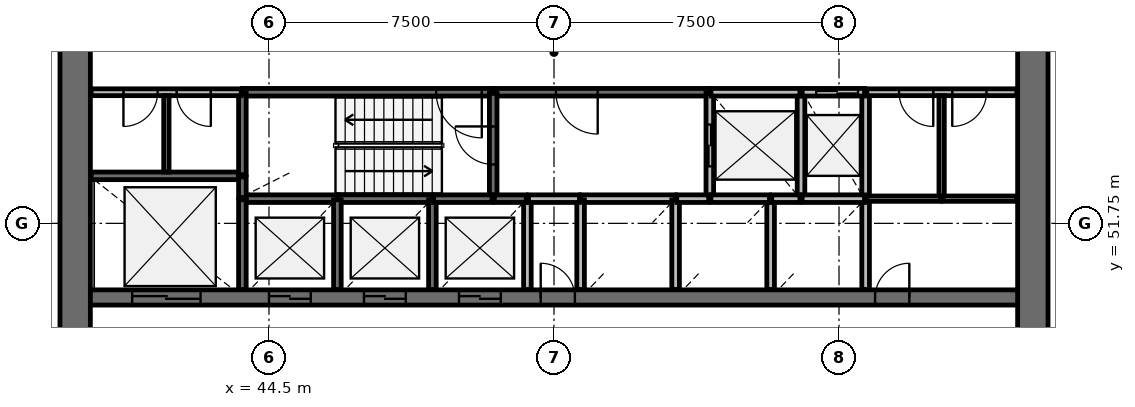
"""IFC4 building model, lengths in metres.
Left out: names, types, materials, properties, quantities, classifications, styles, units other than length and angle.
Written with IfcOpenShell. Run it as: python <this file> out.ifc"""

import sys

from ifc_helpers import new_model, si_unit, direction, frame, frame_2d, origin, place, context, subcontext, project, spatial, rectangle, extrude, source, transform, mapped, element, fill, save


model = new_model("IFC4")
c1 = context("Model", 3, precision=1e-05, world=origin(), true_north=direction((0.0, 1.0)))
c2 = subcontext(c1, "Body", "Model", "MODEL_VIEW")
j1 = project(units=[si_unit("LENGTHUNIT", "METRE"), si_unit("PLANEANGLEUNIT", "RADIAN")], contexts=[c1])
p1 = place(None, origin())
s1 = spatial("IfcSite", under=j1, at=p1, CompositionType="ELEMENT")
p2 = place(p1, origin())
s2 = spatial("IfcBuilding", under=s1, at=p2, CompositionType="ELEMENT")
p3 = place(p2, frame((0.0, 0.0, 100.3)))
s3 = spatial("IfcBuildingStorey", under=s2, at=p3, CompositionType="ELEMENT", Elevation=100.3)
p4 = place(p3, frame((64.6, 38.0, 0.0), z_axis=(0.0, 0.0, 1.0), x_axis=(0.0, 1.0, 0.0)))
e1 = element("IfcWall", 1, at=p4, inside=s3, PredefinedType="SHEAR", context=c2, shape_type="SweptSolid", body=[
    extrude(rectangle(XDim=20.0, YDim=0.8, at=frame_2d((10.0, 0.0))), origin(), (0.0, 0.0, 1.0), 4.1),
])
p5 = place(p4, frame((9.1, 0.0, 0.0)))
e2 = element("IfcOpeningElement", 2, at=p5, cuts=e1, PredefinedType="OPENING", context=c2, shape_type="SweptSolid", body=[
    extrude(rectangle(XDim=1.8, YDim=2.1, at=frame_2d((0.9, 1.05))), frame((0.0, 0.41, 0.0), z_axis=(0.0, -1.0, 0.0), x_axis=(1.0, 0.0, 0.0)), (0.0, 0.0, 1.0), 0.82),
])
p6 = place(p3, frame((39.4, 58.0, 0.0), z_axis=(0.0, 0.0, 1.0), x_axis=(0.0, -1.0, 0.0)))
e3 = element("IfcWall", 3, at=p6, inside=s3, PredefinedType="SHEAR", context=c2, shape_type="SweptSolid", body=[
    extrude(rectangle(XDim=20.0, YDim=0.8, at=frame_2d((10.0, 0.0))), origin(), (0.0, 0.0, 1.0), 4.1),
])
p7 = place(p6, frame((9.1, 0.0, 0.0)))
e4 = element("IfcOpeningElement", 4, at=p7, cuts=e3, PredefinedType="OPENING", context=c2, shape_type="SweptSolid", body=[
    extrude(rectangle(XDim=1.8, YDim=2.1, at=frame_2d((0.9, 1.05))), frame((0.0, 0.41, 0.0), z_axis=(0.0, -1.0, 0.0), x_axis=(1.0, 0.0, 0.0)), (0.0, 0.0, 1.0), 0.82),
])
p8 = place(p3, frame((39.8, 49.8, 0.0), z_axis=(0.0, 0.0, 1.0), x_axis=(1.0, 0.0, 0.0)))
e5 = element("IfcWall", 5, at=p8, inside=s3, PredefinedType="SHEAR", context=c2, shape_type="SweptSolid", body=[
    extrude(rectangle(XDim=24.4, YDim=0.4, at=frame_2d((12.2, 0.0))), origin(), (0.0, 0.0, 1.0), 4.1),
])
p9 = place(p8, frame((4.7, 0.0, 0.0)))
e6 = element("IfcOpeningElement", 6, at=p9, cuts=e5, PredefinedType="OPENING", context=c2, shape_type="SweptSolid", body=[
    extrude(rectangle(XDim=1.1, YDim=2.1, at=frame_2d((0.55, 1.05))), frame((0.0, 0.21, 0.0), z_axis=(0.0, -1.0, 0.0), x_axis=(1.0, 0.0, 0.0)), (0.0, 0.0, 1.0), 0.42),
])
p10 = place(p8, frame((7.2, 0.0, 0.0)))
e7 = element("IfcOpeningElement", 7, at=p10, cuts=e5, PredefinedType="OPENING", context=c2, shape_type="SweptSolid", body=[
    extrude(rectangle(XDim=1.1, YDim=2.1, at=frame_2d((0.55, 1.05))), frame((0.0, 0.21, 0.0), z_axis=(0.0, -1.0, 0.0), x_axis=(1.0, 0.0, 0.0)), (0.0, 0.0, 1.0), 0.42),
])
p11 = place(p8, frame((9.7, 0.0, 0.0)))
e8 = element("IfcOpeningElement", 8, at=p11, cuts=e5, PredefinedType="OPENING", context=c2, shape_type="SweptSolid", body=[
    extrude(rectangle(XDim=1.1, YDim=2.1, at=frame_2d((0.55, 1.05))), frame((0.0, 0.21, 0.0), z_axis=(0.0, -1.0, 0.0), x_axis=(1.0, 0.0, 0.0)), (0.0, 0.0, 1.0), 0.42),
])
p12 = place(p8, frame((1.1, 0.0, 0.0)))
e9 = element("IfcOpeningElement", 9, at=p12, cuts=e5, PredefinedType="OPENING", context=c2, shape_type="SweptSolid", body=[
    extrude(rectangle(XDim=1.8, YDim=2.4, at=frame_2d((0.9, 1.2))), frame((0.0, 0.21, 0.0), z_axis=(0.0, -1.0, 0.0), x_axis=(1.0, 0.0, 0.0)), (0.0, 0.0, 1.0), 0.42),
])
p13 = place(p8, frame((20.65, 0.0, 0.0)))
e10 = element("IfcOpeningElement", 10, at=p13, cuts=e5, PredefinedType="OPENING", context=c2, shape_type="SweptSolid", body=[
    extrude(rectangle(XDim=0.9, YDim=2.1, at=frame_2d((0.45, 1.05))), frame((0.0, 0.21, 0.0), z_axis=(0.0, -1.0, 0.0), x_axis=(1.0, 0.0, 0.0)), (0.0, 0.0, 1.0), 0.42),
])
p14 = place(p8, frame((11.85, 0.0, 0.0)))
e11 = element("IfcOpeningElement", 11, at=p14, cuts=e5, PredefinedType="OPENING", context=c2, shape_type="SweptSolid", body=[
    extrude(rectangle(XDim=0.9, YDim=2.1, at=frame_2d((0.45, 1.05))), frame((0.0, 0.21, 0.0), z_axis=(0.0, -1.0, 0.0), x_axis=(1.0, 0.0, 0.0)), (0.0, 0.0, 1.0), 0.42),
])
p15 = place(p3, frame((50.4, 55.2, 0.0), z_axis=(0.0, 0.0, 1.0), x_axis=(-1.0, 0.0, 0.0)))
e12 = element("IfcWall", 12, at=p15, inside=s3, PredefinedType="SOLIDWALL", context=c2, shape_type="SweptSolid", body=[
    extrude(rectangle(XDim=6.6, YDim=0.2, at=frame_2d((3.3, 0.0))), origin(), (0.0, 0.0, 1.0), 3.7),
])
p16 = place(p15, frame((0.3, 0.0, 0.0)))
e13 = element("IfcOpeningElement", 13, at=p16, cuts=e12, PredefinedType="OPENING", context=c2, shape_type="SweptSolid", body=[
    extrude(rectangle(XDim=1.2, YDim=2.1, at=frame_2d((0.6, 1.05))), frame((0.0, 0.11, 0.0), z_axis=(0.0, -1.0, 0.0), x_axis=(1.0, 0.0, 0.0)), (0.0, 0.0, 1.0), 0.22),
])
p17 = place(p3, frame((56.1, 55.2, 0.0), z_axis=(0.0, 0.0, 1.0), x_axis=(-1.0, 0.0, 0.0)))
e14 = element("IfcWall", 14, at=p17, inside=s3, PredefinedType="SOLIDWALL", context=c2, shape_type="SweptSolid", body=[
    extrude(rectangle(XDim=5.67, YDim=0.2, at=frame_2d((2.835, 0.0))), origin(), (0.0, 0.0, 1.0), 3.7),
])
p18 = place(p17, frame((2.95, 0.0, 0.0)))
e15 = element("IfcOpeningElement", 15, at=p18, cuts=e14, PredefinedType="OPENING", context=c2, shape_type="SweptSolid", body=[
    extrude(rectangle(XDim=1.1, YDim=2.1, at=frame_2d((0.55, 1.05))), frame((0.0, 0.11, 0.0), z_axis=(0.0, -1.0, 0.0), x_axis=(1.0, 0.0, 0.0)), (0.0, 0.0, 1.0), 0.22),
])
p19 = place(p3, frame((43.8, 53.0, 0.0), z_axis=(0.0, 0.0, 1.0), x_axis=(-1.0, 0.0, 0.0)))
e16 = element("IfcWall", 16, at=p19, inside=s3, PredefinedType="SOLIDWALL", context=c2, shape_type="SweptSolid", body=[
    extrude(rectangle(XDim=3.98, YDim=0.2, at=frame_2d((1.99, 0.0))), origin(), (0.0, 0.0, 1.0), 3.7),
])
p20 = place(p3, frame((50.4, 52.4, 0.0), z_axis=(0.0, 0.0, 1.0), x_axis=(0.0, 1.0, 0.0)))
e17 = element("IfcWall", 17, at=p20, inside=s3, PredefinedType="SOLIDWALL", context=c2, shape_type="SweptSolid", body=[
    extrude(rectangle(XDim=2.77, YDim=0.2, at=frame_2d((1.385, 0.0))), origin(), (0.0, 0.0, 1.0), 3.7),
])
p21 = place(p20, frame((0.9, 0.0, 0.0)))
e18 = element("IfcOpeningElement", 18, at=p21, cuts=e17, PredefinedType="OPENING", context=c2, shape_type="SweptSolid", body=[
    extrude(rectangle(XDim=1.0, YDim=2.1, at=frame_2d((0.5, 1.05))), frame((0.0, 0.11, 0.0), z_axis=(0.0, -1.0, 0.0), x_axis=(1.0, 0.0, 0.0)), (0.0, 0.0, 1.0), 0.22),
])
p22 = place(p3, frame((56.1, 55.17, 0.0), z_axis=(0.0, 0.0, 1.0), x_axis=(0.0, -1.0, 0.0)))
e19 = element("IfcWall", 19, at=p22, inside=s3, PredefinedType="SOLIDWALL", context=c2, shape_type="SweptSolid", body=[
    extrude(rectangle(XDim=2.77, YDim=0.2, at=frame_2d((1.385, 0.0))), origin(), (0.0, 0.0, 1.0), 3.7),
])
p23 = place(p22, frame((0.82, 0.0, 0.0)))
e20 = element("IfcOpeningElement", 20, at=p23, cuts=e19, PredefinedType="OPENING", context=c2, shape_type="SweptSolid", body=[
    extrude(rectangle(XDim=1.1, YDim=2.1, at=frame_2d((0.55, 1.05))), frame((0.0, 0.11, 0.0), z_axis=(0.0, -1.0, 0.0), x_axis=(1.0, 0.0, 0.0)), (0.0, 0.0, 1.0), 0.22),
])
for number, where, z_axis, x_axis in (
    (21, (58.5, 52.4, 0.0), (0.0, 0.0, 1.0), (0.0, 1.0, 0.0)),
    (22, (60.2, 52.4, 0.0), (0.0, 0.0, 1.0), (0.0, 1.0, 0.0)),
):
    element("IfcWall", number, at=place(p3, frame(where, z_axis=z_axis, x_axis=x_axis)), inside=s3, PredefinedType="SOLIDWALL", context=c2, shape_type="SweptSolid", body=[
        extrude(rectangle(XDim=2.8, YDim=0.2, at=frame_2d((1.4, 0.0))), origin(), (0.0, 0.0, 1.0), 3.7),
    ])
p24 = place(p3, frame((46.3, 52.4, 0.0), z_axis=(0.0, 0.0, 1.0), x_axis=(-1.0, 0.0, 0.0)))
e23 = element("IfcWall", 23, at=p24, inside=s3, PredefinedType="SOLIDWALL", context=c2, shape_type="SweptSolid", body=[
    extrude(rectangle(XDim=2.5, YDim=0.2, at=frame_2d((1.25, 0.0))), origin(), (0.0, 0.0, 1.0), 3.7),
])
p25 = place(p3, frame((48.8, 52.4, 0.0), z_axis=(0.0, 0.0, 1.0), x_axis=(-1.0, 0.0, 0.0)))
e24 = element("IfcWall", 24, at=p25, inside=s3, PredefinedType="SOLIDWALL", context=c2, shape_type="SweptSolid", body=[
    extrude(rectangle(XDim=2.47, YDim=0.2, at=frame_2d((1.235, 0.0))), origin(), (0.0, 0.0, 1.0), 3.7),
])
p26 = place(p3, frame((55.2, 52.4, 0.0), z_axis=(0.0, 0.0, 1.0), x_axis=(-1.0, 0.0, 0.0)))
e25 = element("IfcWall", 25, at=p26, inside=s3, PredefinedType="SOLIDWALL", context=c2, shape_type="SweptSolid", body=[
    extrude(rectangle(XDim=2.5, YDim=0.2, at=frame_2d((1.25, 0.0))), origin(), (0.0, 0.0, 1.0), 3.7),
])
p27 = place(p3, frame((58.47, 55.2, 0.0), z_axis=(0.0, 0.0, 1.0), x_axis=(-1.0, 0.0, 0.0)))
e26 = element("IfcWall", 26, at=p27, inside=s3, PredefinedType="SOLIDWALL", context=c2, shape_type="SweptSolid", body=[
    extrude(rectangle(XDim=2.34, YDim=0.2, at=frame_2d((1.17, 0.0))), origin(), (0.0, 0.0, 1.0), 3.7),
])
for number, where, z_axis, x_axis in (
    (27, (43.8, 52.37, 0.0), (0.0, 0.0, 1.0), (0.0, -1.0, 0.0)),
    (28, (46.3, 50.01, 0.0), (0.0, 0.0, 1.0), (0.0, 1.0, 0.0)),
    (29, (48.8, 50.01, 0.0), (0.0, 0.0, 1.0), (0.0, 1.0, 0.0)),
):
    element("IfcWall", number, at=place(p3, frame(where, z_axis=z_axis, x_axis=x_axis)), inside=s3, PredefinedType="SOLIDWALL", context=c2, shape_type="SweptSolid", body=[
        extrude(rectangle(XDim=2.36, YDim=0.2, at=frame_2d((1.18, 0.0))), origin(), (0.0, 0.0, 1.0), 3.7),
    ])
p28 = place(p3, frame((51.3, 50.01, 0.0), z_axis=(0.0, 0.0, 1.0), x_axis=(0.0, 1.0, 0.0)))
e30 = element("IfcWall", 30, at=p28, inside=s3, PredefinedType="SOLIDWALL", context=c2, shape_type="SweptSolid", body=[
    extrude(rectangle(XDim=2.39, YDim=0.2, at=frame_2d((1.195, 0.0))), origin(), (0.0, 0.0, 1.0), 3.7),
])
for number, where, z_axis, x_axis in (
    (31, (52.7, 52.37, 0.0), (0.0, 0.0, 1.0), (0.0, -1.0, 0.0)),
    (32, (55.2, 50.01, 0.0), (0.0, 0.0, 1.0), (0.0, 1.0, 0.0)),
):
    element("IfcWall", number, at=place(p3, frame(where, z_axis=z_axis, x_axis=x_axis)), inside=s3, PredefinedType="SOLIDWALL", context=c2, shape_type="SweptSolid", body=[
        extrude(rectangle(XDim=2.36, YDim=0.2, at=frame_2d((1.18, 0.0))), origin(), (0.0, 0.0, 1.0), 3.7),
    ])
p29 = place(p3, frame((57.7, 50.01, 0.0), z_axis=(0.0, 0.0, 1.0), x_axis=(0.0, 1.0, 0.0)))
e33 = element("IfcWall", 33, at=p29, inside=s3, PredefinedType="SOLIDWALL", context=c2, shape_type="SweptSolid", body=[
    extrude(rectangle(XDim=2.39, YDim=0.2, at=frame_2d((1.195, 0.0))), origin(), (0.0, 0.0, 1.0), 3.7),
])
p30 = place(p3, frame((60.2, 50.01, 0.0), z_axis=(0.0, 0.0, 1.0), x_axis=(0.0, 1.0, 0.0)))
e34 = element("IfcWall", 34, at=p30, inside=s3, PredefinedType="SOLIDWALL", context=c2, shape_type="SweptSolid", body=[
    extrude(rectangle(XDim=2.36, YDim=0.2, at=frame_2d((1.18, 0.0))), origin(), (0.0, 0.0, 1.0), 3.7),
])
p31 = place(p3, frame((43.8, 55.17, 0.0), z_axis=(0.0, 0.0, 1.0), x_axis=(0.0, -1.0, 0.0)))
e35 = element("IfcWall", 35, at=p31, inside=s3, PredefinedType="SOLIDWALL", context=c2, shape_type="SweptSolid", body=[
    extrude(rectangle(XDim=2.14, YDim=0.2, at=frame_2d((1.07, 0.0))), origin(), (0.0, 0.0, 1.0), 3.7),
])
p32 = place(p3, frame((60.17, 52.4, 0.0), z_axis=(0.0, 0.0, 1.0), x_axis=(-1.0, 0.0, 0.0)))
e36 = element("IfcWall", 36, at=p32, inside=s3, PredefinedType="SOLIDWALL", context=c2, shape_type="SweptSolid", body=[
    extrude(rectangle(XDim=1.64, YDim=0.2, at=frame_2d((0.82, 0.0))), origin(), (0.0, 0.0, 1.0), 3.7),
])
p33 = place(p3, frame((60.17, 55.2, 0.0), z_axis=(0.0, 0.0, 1.0), x_axis=(-1.0, 0.0, 0.0)))
e37 = element("IfcWall", 37, at=p33, inside=s3, PredefinedType="SOLIDWALL", context=c2, shape_type="SweptSolid", body=[
    extrude(rectangle(XDim=1.64, YDim=0.2, at=frame_2d((0.82, 0.0))), origin(), (0.0, 0.0, 1.0), 3.7),
])
p34 = place(p33, frame((0.17, 0.0, 0.0)))
e38 = element("IfcOpeningElement", 38, at=p34, cuts=e37, PredefinedType="OPENING", context=c2, shape_type="SweptSolid", body=[
    extrude(rectangle(XDim=1.1, YDim=2.1, at=frame_2d((0.55, 1.05))), frame((0.0, 0.11, 0.0), z_axis=(0.0, -1.0, 0.0), x_axis=(1.0, 0.0, 0.0)), (0.0, 0.0, 1.0), 0.22),
])
for number, where, z_axis, x_axis in (
    (39, (50.37, 52.4, 0.0), (0.0, 0.0, 1.0), (-1.0, 0.0, 0.0)),
    (40, (57.67, 52.4, 0.0), (0.0, 0.0, 1.0), (-1.0, 0.0, 0.0)),
):
    element("IfcWall", number, at=place(p3, frame(where, z_axis=z_axis, x_axis=x_axis)), inside=s3, PredefinedType="SOLIDWALL", context=c2, shape_type="SweptSolid", body=[
        extrude(rectangle(XDim=1.54, YDim=0.2, at=frame_2d((0.77, 0.0))), origin(), (0.0, 0.0, 1.0), 3.7),
    ])
p35 = place(p3, frame((51.33, 52.4, 0.0), z_axis=(0.0, 0.0, 1.0), x_axis=(1.0, 0.0, 0.0)))
e41 = element("IfcWall", 41, at=p35, inside=s3, PredefinedType="SOLIDWALL", context=c2, shape_type="SweptSolid", body=[
    extrude(rectangle(XDim=1.34, YDim=0.2, at=frame_2d((0.67, 0.0))), origin(), (0.0, 0.0, 1.0), 3.7),
])
for number, where, z_axis, x_axis in (
    (42, (51.27, 52.4, 0.0), (0.0, 0.0, 1.0), (-1.0, 0.0, 0.0)),
    (43, (56.07, 52.4, 0.0), (0.0, 0.0, 1.0), (-1.0, 0.0, 0.0)),
):
    element("IfcWall", number, at=place(p3, frame(where, z_axis=z_axis, x_axis=x_axis)), inside=s3, PredefinedType="SOLIDWALL", context=c2, shape_type="SweptSolid", body=[
        extrude(rectangle(XDim=0.84, YDim=0.2, at=frame_2d((0.42, 0.0))), origin(), (0.0, 0.0, 1.0), 3.7),
    ])
p36 = place(p3, frame((58.47, 52.4, 0.0), z_axis=(0.0, 0.0, 1.0), x_axis=(-1.0, 0.0, 0.0)))
e44 = element("IfcWall", 44, at=p36, inside=s3, PredefinedType="SOLIDWALL", context=c2, shape_type="SweptSolid", body=[
    extrude(rectangle(XDim=0.74, YDim=0.2, at=frame_2d((0.37, 0.0))), origin(), (0.0, 0.0, 1.0), 3.7),
])
p37 = place(p3, frame((43.8, 52.43, 0.0), z_axis=(0.0, 0.0, 1.0), x_axis=(0.0, 1.0, 0.0)))
e45 = element("IfcWall", 45, at=p37, inside=s3, PredefinedType="SOLIDWALL", context=c2, shape_type="SweptSolid", body=[
    extrude(rectangle(XDim=0.54, YDim=0.2, at=frame_2d((0.27, 0.0))), origin(), (0.0, 0.0, 1.0), 3.7),
])
p38 = place(p3, frame((64.18, 55.2, 0.0), z_axis=(0.0, 0.0, 1.0), x_axis=(-1.0, 0.0, 0.0)))
e46 = element("IfcWall", 46, at=p38, inside=s3, PredefinedType="PARTITIONING", context=c2, shape_type="SweptSolid", body=[
    extrude(rectangle(XDim=3.95, YDim=0.18, at=frame_2d((1.975, 0.0))), origin(), (0.0, 0.0, 1.0), 3.7),
])
p39 = place(p38, frame((2.2, 0.0, 0.0)))
e47 = element("IfcOpeningElement", 47, at=p39, cuts=e46, PredefinedType="OPENING", context=c2, shape_type="SweptSolid", body=[
    extrude(rectangle(XDim=0.9, YDim=2.1, at=frame_2d((0.45, 1.05))), frame((0.0, 0.1, 0.0), z_axis=(0.0, -1.0, 0.0), x_axis=(1.0, 0.0, 0.0)), (0.0, 0.0, 1.0), 0.2),
])
p40 = place(p38, frame((0.8, 0.0, 0.0)))
e48 = element("IfcOpeningElement", 48, at=p40, cuts=e46, PredefinedType="OPENING", context=c2, shape_type="SweptSolid", body=[
    extrude(rectangle(XDim=0.9, YDim=2.1, at=frame_2d((0.45, 1.05))), frame((0.0, 0.1, 0.0), z_axis=(0.0, -1.0, 0.0), x_axis=(1.0, 0.0, 0.0)), (0.0, 0.0, 1.0), 0.2),
])
p41 = place(p3, frame((43.77, 55.2, 0.0), z_axis=(0.0, 0.0, 1.0), x_axis=(-1.0, 0.0, 0.0)))
e49 = element("IfcWall", 49, at=p41, inside=s3, PredefinedType="PARTITIONING", context=c2, shape_type="SweptSolid", body=[
    extrude(rectangle(XDim=3.95, YDim=0.18, at=frame_2d((1.975, 0.0))), origin(), (0.0, 0.0, 1.0), 3.7),
])
p42 = place(p41, frame((2.2, 0.0, 0.0)))
e50 = element("IfcOpeningElement", 50, at=p42, cuts=e49, PredefinedType="OPENING", context=c2, shape_type="SweptSolid", body=[
    extrude(rectangle(XDim=0.9, YDim=2.1, at=frame_2d((0.45, 1.05))), frame((0.0, 0.1, 0.0), z_axis=(0.0, -1.0, 0.0), x_axis=(1.0, 0.0, 0.0)), (0.0, 0.0, 1.0), 0.2),
])
p43 = place(p41, frame((0.8, 0.0, 0.0)))
e51 = element("IfcOpeningElement", 51, at=p43, cuts=e49, PredefinedType="OPENING", context=c2, shape_type="SweptSolid", body=[
    extrude(rectangle(XDim=0.9, YDim=2.1, at=frame_2d((0.45, 1.05))), frame((0.0, 0.1, 0.0), z_axis=(0.0, -1.0, 0.0), x_axis=(1.0, 0.0, 0.0)), (0.0, 0.0, 1.0), 0.2),
])
p44 = place(p3, frame((62.2, 52.4, 0.0), z_axis=(0.0, 0.0, 1.0), x_axis=(0.0, 1.0, 0.0)))
e52 = element("IfcWall", 52, at=p44, inside=s3, PredefinedType="PARTITIONING", context=c2, shape_type="SweptSolid", body=[
    extrude(rectangle(XDim=2.71, YDim=0.14, at=frame_2d((1.355, 0.0))), origin(), (0.0, 0.0, 1.0), 2.9),
])
p45 = place(p3, frame((41.8, 53.1, 0.0), z_axis=(0.0, 0.0, 1.0), x_axis=(0.0, 1.0, 0.0)))
e53 = element("IfcWall", 53, at=p45, inside=s3, PredefinedType="PARTITIONING", context=c2, shape_type="SweptSolid", body=[
    extrude(rectangle(XDim=2.01, YDim=0.14, at=frame_2d((1.005, 0.0))), origin(), (0.0, 0.0, 1.0), 2.9),
])
p46 = place(p3, frame((62.17, 52.4, 0.0), z_axis=(0.0, 0.0, 1.0), x_axis=(-1.0, 0.0, 0.0)))
e54 = element("IfcWall", 54, at=p46, inside=s3, PredefinedType="PARTITIONING", context=c2, shape_type="SweptSolid", body=[
    extrude(rectangle(XDim=1.94, YDim=0.14, at=frame_2d((0.97, 0.0))), origin(), (0.0, 0.0, 1.0), 2.9),
])
p47 = place(p3, frame((64.18, 52.4, 0.0), z_axis=(0.0, 0.0, 1.0), x_axis=(-1.0, 0.0, 0.0)))
e55 = element("IfcWall", 55, at=p47, inside=s3, PredefinedType="PARTITIONING", context=c2, shape_type="SweptSolid", body=[
    extrude(rectangle(XDim=1.95, YDim=0.14, at=frame_2d((0.975, 0.0))), origin(), (0.0, 0.0, 1.0), 2.9),
])
m1 = source(origin(), c2, "Body", "SweptSolid", [
    extrude(rectangle(XDim=1.1, YDim=2.1, at=frame_2d((0.55, 1.05))), frame((0.0, 0.025, 0.0), z_axis=(0.0, -1.0, 0.0), x_axis=(1.0, 0.0, 0.0)), (0.0, 0.0, 1.0), 0.05),
])
p48 = place(p9, origin())
e56 = element("IfcDoor", 56, at=p48, inside=s3, OperationType="DOUBLE_DOOR_SLIDING", PredefinedType="USERDEFINED", context=c2, shape_type="MappedRepresentation", body=[
    mapped(m1, transform((0.0, 0.0, 0.0), scale=1.0)),
])
fill(e6, e56)
p49 = place(p10, origin())
e57 = element("IfcDoor", 57, at=p49, inside=s3, OperationType="DOUBLE_DOOR_SLIDING", PredefinedType="USERDEFINED", context=c2, shape_type="MappedRepresentation", body=[
    mapped(m1, transform((0.0, 0.0, 0.0), scale=1.0)),
])
fill(e7, e57)
p50 = place(p11, origin())
e58 = element("IfcDoor", 58, at=p50, inside=s3, OperationType="DOUBLE_DOOR_SLIDING", PredefinedType="USERDEFINED", context=c2, shape_type="MappedRepresentation", body=[
    mapped(m1, transform((0.0, 0.0, 0.0), scale=1.0)),
])
fill(e8, e58)
p51 = place(p23, origin())
e59 = element("IfcDoor", 59, at=p51, inside=s3, OperationType="DOUBLE_DOOR_SLIDING", PredefinedType="USERDEFINED", context=c2, shape_type="MappedRepresentation", body=[
    mapped(m1, transform((0.0, 0.0, 0.0), scale=1.0)),
])
fill(e20, e59)
p52 = place(p34, origin())
e60 = element("IfcDoor", 60, at=p52, inside=s3, OperationType="DOUBLE_DOOR_SLIDING", PredefinedType="USERDEFINED", context=c2, shape_type="MappedRepresentation", body=[
    mapped(m1, transform((0.0, 0.0, 0.0), scale=1.0)),
])
fill(e38, e60)
m2 = source(origin(), c2, "Body", "SweptSolid", [
    extrude(rectangle(XDim=1.8, YDim=2.4, at=frame_2d((0.9, 1.2))), frame((0.0, 0.025, 0.0), z_axis=(0.0, -1.0, 0.0), x_axis=(1.0, 0.0, 0.0)), (0.0, 0.0, 1.0), 0.05),
])
p53 = place(p12, origin())
e61 = element("IfcDoor", 61, at=p53, inside=s3, OperationType="DOUBLE_DOOR_SLIDING", PredefinedType="USERDEFINED", context=c2, shape_type="MappedRepresentation", body=[
    mapped(m2, transform((0.0, 0.0, 0.0), scale=1.0)),
])
fill(e9, e61)
m3 = source(origin(), c2, "Body", "SweptSolid", [
    extrude(rectangle(XDim=1.2, YDim=2.1, at=frame_2d((0.6, 1.05))), frame((0.0, 0.025, 0.0), z_axis=(0.0, -1.0, 0.0), x_axis=(1.0, 0.0, 0.0)), (0.0, 0.0, 1.0), 0.05),
])
p54 = place(p16, origin())
e62 = element("IfcDoor", 62, at=p54, inside=s3, OperationType="SINGLE_SWING_LEFT", PredefinedType="DOOR", context=c2, shape_type="MappedRepresentation", body=[
    mapped(m3, transform((0.0, 0.0, 0.0), scale=1.0)),
])
fill(e13, e62)
m4 = source(origin(), c2, "Body", "SweptSolid", [
    extrude(rectangle(XDim=1.0, YDim=2.1, at=frame_2d((0.5, 1.05))), frame((0.0, 0.025, 0.0), z_axis=(0.0, -1.0, 0.0), x_axis=(1.0, 0.0, 0.0)), (0.0, 0.0, 1.0), 0.05),
])
p55 = place(p21, origin())
e63 = element("IfcDoor", 63, at=p55, inside=s3, OperationType="SINGLE_SWING_RIGHT", PredefinedType="DOOR", context=c2, shape_type="MappedRepresentation", body=[
    mapped(m4, transform((0.0, 0.0, 0.0), scale=1.0)),
])
fill(e18, e63)
m5 = source(origin(), c2, "Body", "SweptSolid", [
    extrude(rectangle(XDim=1.1, YDim=2.1, at=frame_2d((0.55, 1.05))), frame((0.0, 0.025, 0.0), z_axis=(0.0, -1.0, 0.0), x_axis=(1.0, 0.0, 0.0)), (0.0, 0.0, 1.0), 0.05),
])
p56 = place(p18, origin())
e64 = element("IfcDoor", 64, at=p56, inside=s3, OperationType="SINGLE_SWING_LEFT", PredefinedType="DOOR", context=c2, shape_type="MappedRepresentation", body=[
    mapped(m5, transform((0.0, 0.0, 0.0), scale=1.0)),
])
fill(e15, e64)
m6 = source(origin(), c2, "Body", "SweptSolid", [
    extrude(rectangle(XDim=0.9, YDim=2.1, at=frame_2d((0.45, 1.05))), frame((0.0, 0.025, 0.0), z_axis=(0.0, -1.0, 0.0), x_axis=(1.0, 0.0, 0.0)), (0.0, 0.0, 1.0), 0.05),
])
p57 = place(p42, origin())
e65 = element("IfcDoor", 65, at=p57, inside=s3, OperationType="SINGLE_SWING_RIGHT", PredefinedType="DOOR", context=c2, shape_type="MappedRepresentation", body=[
    mapped(m6, transform((0.0, 0.0, 0.0), scale=1.0)),
])
fill(e50, e65)
p58 = place(p43, origin())
e66 = element("IfcDoor", 66, at=p58, inside=s3, OperationType="SINGLE_SWING_LEFT", PredefinedType="DOOR", context=c2, shape_type="MappedRepresentation", body=[
    mapped(m6, transform((0.0, 0.0, 0.0), scale=1.0)),
])
fill(e51, e66)
p59 = place(p13, origin())
e67 = element("IfcDoor", 67, at=p59, inside=s3, OperationType="SINGLE_SWING_RIGHT", PredefinedType="DOOR", context=c2, shape_type="MappedRepresentation", body=[
    mapped(m6, transform((0.0, 0.0, 0.0), scale=1.0)),
])
fill(e10, e67)
p60 = place(p39, origin())
e68 = element("IfcDoor", 68, at=p60, inside=s3, OperationType="SINGLE_SWING_LEFT", PredefinedType="DOOR", context=c2, shape_type="MappedRepresentation", body=[
    mapped(m6, transform((0.0, 0.0, 0.0), scale=1.0)),
])
fill(e47, e68)
p61 = place(p40, origin())
e69 = element("IfcDoor", 69, at=p61, inside=s3, OperationType="SINGLE_SWING_RIGHT", PredefinedType="DOOR", context=c2, shape_type="MappedRepresentation", body=[
    mapped(m6, transform((0.0, 0.0, 0.0), scale=1.0)),
])
fill(e48, e69)
p62 = place(p14, origin())
e70 = element("IfcDoor", 70, at=p62, inside=s3, OperationType="SINGLE_SWING_LEFT", PredefinedType="DOOR", context=c2, shape_type="MappedRepresentation", body=[
    mapped(m6, transform((0.0, 0.0, 0.0), scale=1.0)),
])
fill(e11, e70)
save(model, sys.argv[1])
